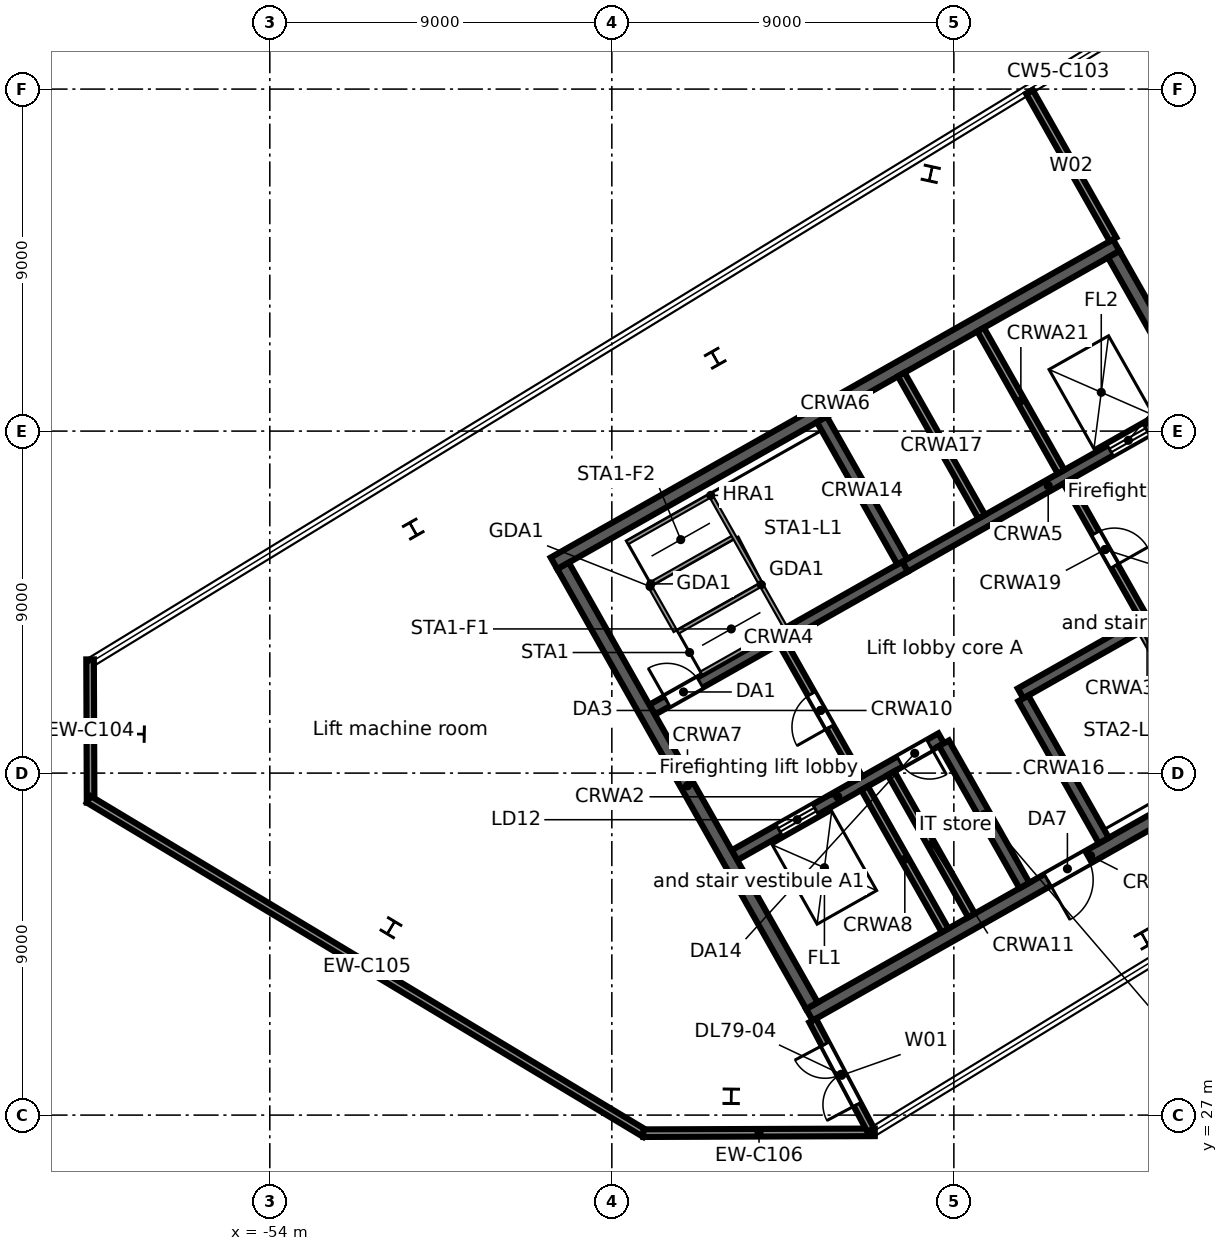
"""IFC4 building model, lengths in metres.
Left out: names, types, materials, properties, quantities, classifications, styles, units other than length and angle.
Written with IfcOpenShell. Run it as: python <this file> out.ifc"""

import sys

from ifc_helpers import new_model, si_unit, direction, frame, frame_2d, origin, origin_2d, place, context, subcontext, project, spatial, rectangle, i_section, extrude, element, fill, save


model = new_model("IFC4")
c1 = context("Model", 3, precision=1e-05, world=origin(), true_north=direction((0.0, 1.0)))
c2 = subcontext(c1, "Body", "Model", "MODEL_VIEW")
j1 = project(units=[si_unit("LENGTHUNIT", "METRE"), si_unit("PLANEANGLEUNIT", "RADIAN")], contexts=[c1])
p1 = place(None, origin())
s1 = spatial("IfcSite", under=j1, at=p1, CompositionType="ELEMENT")
p2 = place(p1, origin())
s2 = spatial("IfcBuilding", under=s1, at=p2, CompositionType="ELEMENT")
p3 = place(p2, frame((0.0, 0.0, 346.9)))
s3 = spatial("IfcBuildingStorey", under=s2, at=p3, CompositionType="ELEMENT", Elevation=346.9)
for number, where, z_axis, x_axis in (
    (1, (-42.28, 46.919, 0.0), (0.0, 0.0, 1.0), (-0.87, -0.492, 0.0)),
    (2, (-50.226, 42.423, 0.0), (0.0, 0.0, 1.0), (-0.87, -0.492, 0.0)),
    (3, (-57.493, 37.027, 0.0), (0.0, 0.0, 1.0), (-0.013, -1.0, 0.0)),
    (4, (-50.812, 31.931, 0.0), (0.0, 0.0, 1.0), (0.857, -0.515, 0.0)),
    (5, (-41.858, 27.495, 0.0), (0.0, 0.0, 1.0), (1.0, -0.013, 0.0)),
    (6, (-30.976, 31.635, 0.0), (0.0, 0.0, 1.0), (0.87, 0.492, 0.0)),
):
    element("IfcColumn", number, at=place(p3, frame(where, z_axis=z_axis, x_axis=x_axis)), inside=s3, PredefinedType="COLUMN", context=c2, shape_type="SweptSolid", body=[
        extrude(i_section(OverallWidth=0.4, OverallDepth=0.4, WebThickness=0.013, FlangeThickness=0.021, FilletRadius=0.022, at=origin_2d()), origin(), (0.0, 0.0, 1.0), 3.6),
    ])
p4 = place(p3, frame((-36.609, 51.77, -0.3), z_axis=(0.0, 0.0, 1.0), x_axis=(-0.97666103348, 0.214786465314, 0.0)))
e7 = element("IfcColumn", 7, at=p4, inside=s3, PredefinedType="COLUMN", context=c2, shape_type="SweptSolid", body=[
    extrude(i_section(OverallWidth=0.4, OverallDepth=0.4, WebThickness=0.013, FlangeThickness=0.021, FilletRadius=0.022, at=origin_2d()), origin(), (0.0, 0.0, 1.0), 3.9),
])
p5 = place(p3, frame((-58.716, 35.224, 0.0), z_axis=(0.0, 0.0, 1.0), x_axis=(-0.003563076631, 0.999993652222, 0.0)))
e8 = element("IfcWall", 8, at=p5, inside=s3, PredefinedType="STANDARD", context=c2, shape_type="SweptSolid", body=[
    extrude(rectangle(XDim=3.769, YDim=0.2, at=frame_2d((1.884, 0.0))), origin(), (0.0, 0.0, 1.0), 3.3),
])
p6 = place(p3, frame((-44.12, 26.51, 0.0), z_axis=(0.0, 0.0, 1.0), x_axis=(-0.85716996621, 0.515033638734, 0.0)))
e9 = element("IfcWall", 9, at=p6, inside=s3, PredefinedType="STANDARD", context=c2, shape_type="SweptSolid", body=[
    extrude(rectangle(XDim=17.084, YDim=0.2, at=frame_2d((8.542, 0.0))), origin(), (0.0, 0.0, 1.0), 3.3),
])
p7 = place(p3, frame((-38.081, 26.546, 0.0), z_axis=(0.0, 0.0, 1.0), x_axis=(-0.999993637837, -0.003567111574, 0.0)))
e10 = element("IfcWall", 10, at=p7, inside=s3, PredefinedType="STANDARD", context=c2, shape_type="SweptSolid", body=[
    extrude(rectangle(XDim=6.091, YDim=0.2, at=frame_2d((3.046, 0.0))), origin(), (0.0, 0.0, 1.0), 3.3),
])
p8 = place(p3, frame((-39.801, 29.64, 0.0), z_axis=(0.0, 0.0, 1.0), x_axis=(0.870359753402, 0.492416388494, 0.0)))
e11 = element("IfcWall", 11, at=p8, inside=s3, PredefinedType="SOLIDWALL", context=c2, shape_type="SweptSolid", body=[
    extrude(rectangle(XDim=17.0, YDim=0.35, at=frame_2d((8.5, 0.0))), origin(), (0.0, 0.0, 1.0), 3.3),
])
p9 = place(p8, frame((7.2, 0.0, 0.0)))
e12 = element("IfcOpeningElement", 12, at=p9, cuts=e11, PredefinedType="OPENING", context=c2, shape_type="SweptSolid", body=[
    extrude(rectangle(XDim=1.2, YDim=2.1, at=frame_2d((0.6, 1.05))), frame((0.0, 0.185, 0.0), z_axis=(0.0, -1.0, 0.0), x_axis=(1.0, 0.0, 0.0)), (0.0, 0.0, 1.0), 0.37),
])
p10 = place(p3, frame((-41.774, 33.838, 0.0), z_axis=(0.0, 0.0, 1.0), x_axis=(0.870355415866, 0.492424055132, 0.0)))
e13 = element("IfcWall", 13, at=p10, inside=s3, PredefinedType="SOLIDWALL", context=c2, shape_type="SweptSolid", body=[
    extrude(rectangle(XDim=6.25, YDim=0.3, at=frame_2d((3.125, 0.0))), origin(), (0.0, 0.0, 1.0), 3.3),
])
p11 = place(p10, frame((1.35, 0.0, 0.0)))
e14 = element("IfcOpeningElement", 14, at=p11, cuts=e13, PredefinedType="OPENING", context=c2, shape_type="SweptSolid", body=[
    extrude(rectangle(XDim=1.1, YDim=2.1, at=frame_2d((0.55, 1.05))), frame((0.0, 0.16, 0.0), z_axis=(0.0, -1.0, 0.0), x_axis=(1.0, 0.0, 0.0)), (0.0, 0.0, 1.0), 0.32),
])
p12 = place(p10, frame((5.0, 0.0, 0.0)))
e15 = element("IfcOpeningElement", 15, at=p12, cuts=e13, PredefinedType="OPENING", context=c2, shape_type="SweptSolid", body=[
    extrude(rectangle(XDim=0.9, YDim=2.1, at=frame_2d((0.45, 1.05))), frame((0.0, 0.16, 0.0), z_axis=(0.0, -1.0, 0.0), x_axis=(1.0, 0.0, 0.0)), (0.0, 0.0, 1.0), 0.32),
])
p13 = place(p3, frame((-34.245, 38.097, 0.0), z_axis=(0.0, 0.0, 1.0), x_axis=(0.870352347706, 0.49242947804, 0.0)))
e16 = element("IfcWall", 16, at=p13, inside=s3, PredefinedType="SOLIDWALL", context=c2, shape_type="SweptSolid", body=[
    extrude(rectangle(XDim=7.65, YDim=0.3, at=frame_2d((3.825, 0.0))), origin(), (0.0, 0.0, 1.0), 3.3),
])
p14 = place(p13, frame((6.2, 0.0, 0.0)))
e17 = element("IfcOpeningElement", 17, at=p14, cuts=e16, PredefinedType="OPENING", context=c2, shape_type="SweptSolid", body=[
    extrude(rectangle(XDim=1.0, YDim=2.1, at=frame_2d((0.5, 1.05))), frame((0.0, 0.16, 0.0), z_axis=(0.0, -1.0, 0.0), x_axis=(1.0, 0.0, 0.0)), (0.0, 0.0, 1.0), 0.32),
])
p15 = place(p3, frame((-43.94, 37.667, 0.0), z_axis=(0.0, 0.0, 1.0), x_axis=(0.870352347706, 0.49242947804, 0.0)))
e18 = element("IfcWall", 18, at=p15, inside=s3, PredefinedType="SOLIDWALL", context=c2, shape_type="SweptSolid", body=[
    extrude(rectangle(XDim=7.65, YDim=0.3, at=frame_2d((3.825, 0.0))), origin(), (0.0, 0.0, 1.0), 3.3),
])
p16 = place(p15, frame((0.45, 0.0, 0.0)))
e19 = element("IfcOpeningElement", 19, at=p16, cuts=e18, PredefinedType="OPENING", context=c2, shape_type="SweptSolid", body=[
    extrude(rectangle(XDim=1.0, YDim=2.1, at=frame_2d((0.5, 1.05))), frame((0.0, 0.16, 0.0), z_axis=(0.0, -1.0, 0.0), x_axis=(1.0, 0.0, 0.0)), (0.0, 0.0, 1.0), 0.32),
])
p17 = place(p3, frame((-37.282, 41.435, 0.0), z_axis=(0.0, 0.0, 1.0), x_axis=(0.870364588774, 0.492407841741, 0.0)))
e20 = element("IfcWall", 20, at=p17, inside=s3, PredefinedType="SOLIDWALL", context=c2, shape_type="SweptSolid", body=[
    extrude(rectangle(XDim=8.65, YDim=0.3, at=frame_2d((4.325, 0.0))), origin(), (0.0, 0.0, 1.0), 3.3),
])
p18 = place(p17, frame((6.2, 0.0, 0.0)))
e21 = element("IfcOpeningElement", 21, at=p18, cuts=e20, PredefinedType="OPENING", context=c2, shape_type="SweptSolid", body=[
    extrude(rectangle(XDim=1.1, YDim=2.1, at=frame_2d((0.55, 1.05))), frame((0.0, 0.16, 0.0), z_axis=(0.0, -1.0, 0.0), x_axis=(1.0, 0.0, 0.0)), (0.0, 0.0, 1.0), 0.32),
])
p19 = place(p3, frame((-46.522, 41.521, 0.0), z_axis=(0.0, 0.0, 1.0), x_axis=(0.870359753402, 0.492416388494, 0.0)))
e22 = element("IfcWall", 22, at=p19, inside=s3, PredefinedType="SOLIDWALL", context=c2, shape_type="SweptSolid", body=[
    extrude(rectangle(XDim=17.0, YDim=0.35, at=frame_2d((8.5, 0.0))), origin(), (0.0, 0.0, 1.0), 3.3),
])
p20 = place(p3, frame((-46.284, 41.454, 0.0), z_axis=(0.0, 0.0, 1.0), x_axis=(0.492429810477, -0.870352159619, 0.0)))
e23 = element("IfcWall", 23, at=p20, inside=s3, PredefinedType="SOLIDWALL", context=c2, shape_type="SweptSolid", body=[
    extrude(rectangle(XDim=13.3, YDim=0.35, at=frame_2d((6.65, 0.0))), origin(), (0.0, 0.0, 1.0), 3.3),
])
p21 = place(p3, frame((-38.349, 35.603, 0.0), z_axis=(0.0, 0.0, 1.0), x_axis=(0.492410799949, -0.870362915164, 0.0)))
e24 = element("IfcWall", 24, at=p21, inside=s3, PredefinedType="SOLIDWALL", context=c2, shape_type="SweptSolid", body=[
    extrude(rectangle(XDim=4.3, YDim=0.2, at=frame_2d((2.15, 0.0))), origin(), (0.0, 0.0, 1.0), 3.3),
])
p22 = place(p3, frame((-40.516, 39.433, 0.0), z_axis=(0.0, 0.0, 1.0), x_axis=(0.492453559952, -0.87033872216, 0.0)))
e25 = element("IfcWall", 25, at=p22, inside=s3, PredefinedType="PARTITIONING", context=c2, shape_type="SweptSolid", body=[
    extrude(rectangle(XDim=4.1, YDim=0.2, at=frame_2d((2.05, 0.0))), origin(), (0.0, 0.0, 1.0), 3.3),
])
p23 = place(p22, frame((1.55, 0.0, 0.0)))
e26 = element("IfcOpeningElement", 26, at=p23, cuts=e25, PredefinedType="OPENING", context=c2, shape_type="SweptSolid", body=[
    extrude(rectangle(XDim=1.0, YDim=2.1, at=frame_2d((0.5, 1.05))), frame((0.0, 0.11, 0.0), z_axis=(0.0, -1.0, 0.0), x_axis=(1.0, 0.0, 0.0)), (0.0, 0.0, 1.0), 0.22),
])
p24 = place(p3, frame((-37.653, 35.997, 0.0), z_axis=(0.0, 0.0, 1.0), x_axis=(0.492435133428, -0.870349147967, 0.0)))
e27 = element("IfcWall", 27, at=p24, inside=s3, PredefinedType="SOLIDWALL", context=c2, shape_type="SweptSolid", body=[
    extrude(rectangle(XDim=4.3, YDim=0.2, at=frame_2d((2.15, 0.0))), origin(), (0.0, 0.0, 1.0), 3.3),
])
p25 = place(p3, frame((-36.26, 36.785, 0.0), z_axis=(0.0, 0.0, 1.0), x_axis=(0.492435133428, -0.870349147967, 0.0)))
e28 = element("IfcWall", 28, at=p25, inside=s3, PredefinedType="SOLIDWALL", context=c2, shape_type="SweptSolid", body=[
    extrude(rectangle(XDim=4.3, YDim=0.3, at=frame_2d((2.15, 0.0))), origin(), (0.0, 0.0, 1.0), 3.3),
])
p26 = place(p3, frame((-39.473, 45.308, 0.0), z_axis=(0.0, 0.0, 1.0), x_axis=(0.492410799949, -0.870362915164, 0.0)))
e29 = element("IfcWall", 29, at=p26, inside=s3, PredefinedType="SOLIDWALL", context=c2, shape_type="SweptSolid", body=[
    extrude(rectangle(XDim=4.3, YDim=0.3, at=frame_2d((2.15, 0.0))), origin(), (0.0, 0.0, 1.0), 3.3),
])
p27 = place(p3, frame((-34.171, 37.967, 0.0), z_axis=(0.0, 0.0, 1.0), x_axis=(0.492435133428, -0.870349147967, 0.0)))
e30 = element("IfcWall", 30, at=p27, inside=s3, PredefinedType="SOLIDWALL", context=c2, shape_type="SweptSolid", body=[
    extrude(rectangle(XDim=4.3, YDim=0.3, at=frame_2d((2.15, 0.0))), origin(), (0.0, 0.0, 1.0), 3.3),
])
p28 = place(p3, frame((-37.385, 46.49, 0.0), z_axis=(0.0, 0.0, 1.0), x_axis=(0.492410799949, -0.870362915164, 0.0)))
e31 = element("IfcWall", 31, at=p28, inside=s3, PredefinedType="SOLIDWALL", context=c2, shape_type="SweptSolid", body=[
    extrude(rectangle(XDim=4.3, YDim=0.2, at=frame_2d((2.15, 0.0))), origin(), (0.0, 0.0, 1.0), 3.3),
])
p29 = place(p3, frame((-33.031, 43.667, 0.0), z_axis=(0.0, 0.0, 1.0), x_axis=(0.492408451753, -0.87036424366, 0.0)))
e32 = element("IfcWall", 32, at=p29, inside=s3, PredefinedType="PARTITIONING", context=c2, shape_type="SweptSolid", body=[
    extrude(rectangle(XDim=4.1, YDim=0.2, at=frame_2d((2.05, 0.0))), origin(), (0.0, 0.0, 1.0), 3.3),
])
p30 = place(p29, frame((1.55, 0.0, 0.0)))
e33 = element("IfcOpeningElement", 33, at=p30, cuts=e32, PredefinedType="OPENING", context=c2, shape_type="SweptSolid", body=[
    extrude(rectangle(XDim=1.0, YDim=2.1, at=frame_2d((0.5, 1.05))), frame((0.0, 0.11, 0.0), z_axis=(0.0, -1.0, 0.0), x_axis=(1.0, 0.0, 0.0)), (0.0, 0.0, 1.0), 0.22),
])
p31 = place(p3, frame((-35.296, 47.671, 0.0), z_axis=(0.0, 0.0, 1.0), x_axis=(0.492435133428, -0.870349147967, 0.0)))
e34 = element("IfcWall", 34, at=p31, inside=s3, PredefinedType="SOLIDWALL", context=c2, shape_type="SweptSolid", body=[
    extrude(rectangle(XDim=4.3, YDim=0.2, at=frame_2d((2.15, 0.0))), origin(), (0.0, 0.0, 1.0), 3.3),
])
p32 = place(p3, frame((-31.792, 49.653, 0.0), z_axis=(0.0, 0.0, 1.0), x_axis=(0.492421943245, -0.870356610712, 0.0)))
e35 = element("IfcWall", 35, at=p32, inside=s3, PredefinedType="SOLIDWALL", context=c2, shape_type="SweptSolid", body=[
    extrude(rectangle(XDim=13.3, YDim=0.35, at=frame_2d((6.65, 0.0))), origin(), (0.0, 0.0, 1.0), 3.3),
])
p33 = place(p3, frame((-39.715, 29.488, 0.0), z_axis=(0.0, 0.0, 1.0), x_axis=(0.467963390189, -0.883747851733, 0.0)))
e36 = element("IfcWall", 36, at=p33, inside=s3, PredefinedType="PARTITIONING", context=c2, shape_type="SweptSolid", body=[
    extrude(rectangle(XDim=3.261, YDim=0.2, at=frame_2d((1.631, 0.0))), origin(), (0.0, 0.0, 1.0), 2.68),
])
p34 = place(p33, frame((0.7, 0.0, 0.0)))
e37 = element("IfcOpeningElement", 37, at=p34, cuts=e36, PredefinedType="OPENING", context=c2, shape_type="SweptSolid", body=[
    extrude(rectangle(XDim=1.8, YDim=2.1, at=frame_2d((0.9, 1.05))), frame((0.0, 0.11, 0.0), z_axis=(0.0, -1.0, 0.0), x_axis=(1.0, 0.0, 0.0)), (0.0, 0.0, 1.0), 0.22),
])
p35 = place(p3, frame((-34.012, 53.93, 0.0), z_axis=(0.0, 0.0, 1.0), x_axis=(0.49265524993, -0.870224571428, 0.0)))
e38 = element("IfcWall", 38, at=p35, inside=s3, PredefinedType="PARTITIONING", context=c2, shape_type="SweptSolid", body=[
    extrude(rectangle(XDim=4.466, YDim=0.2, at=frame_2d((2.233, 0.0))), origin(), (0.0, 0.0, 1.0), 2.68),
])
p36 = place(p18, origin())
e39 = element("IfcDoor", 39, at=p36, inside=s3, OperationType="DOUBLE_DOOR_SLIDING", PredefinedType="DOOR", context=c2, shape_type="SweptSolid", body=[
    extrude(rectangle(XDim=1.1, YDim=2.1, at=frame_2d((0.55, 1.05))), frame((0.0, 0.025, 0.0), z_axis=(0.0, -1.0, 0.0), x_axis=(1.0, 0.0, 0.0)), (0.0, 0.0, 1.0), 0.05),
])
fill(e21, e39)
p37 = place(p11, origin())
e40 = element("IfcDoor", 40, at=p37, inside=s3, OperationType="DOUBLE_DOOR_SLIDING", PredefinedType="DOOR", context=c2, shape_type="SweptSolid", body=[
    extrude(rectangle(XDim=1.1, YDim=2.1, at=frame_2d((0.55, 1.05))), frame((0.0, 0.025, 0.0), z_axis=(0.0, -1.0, 0.0), x_axis=(1.0, 0.0, 0.0)), (0.0, 0.0, 1.0), 0.05),
])
fill(e14, e40)
p38 = place(p16, origin())
e41 = element("IfcDoor", 41, at=p38, inside=s3, OperationType="SINGLE_SWING_LEFT", PredefinedType="DOOR", context=c2, shape_type="SweptSolid", body=[
    extrude(rectangle(XDim=1.0, YDim=2.1, at=frame_2d((0.5, 1.05))), frame((0.0, 0.025, 0.0), z_axis=(0.0, -1.0, 0.0), x_axis=(1.0, 0.0, 0.0)), (0.0, 0.0, 1.0), 0.05),
])
fill(e19, e41)
p39 = place(p23, frame((1.0, 0.0, 0.0), z_axis=(0.0, 0.0, 1.0), x_axis=(-1.0, 0.0, 0.0)))
e42 = element("IfcDoor", 42, at=p39, inside=s3, OperationType="SINGLE_SWING_LEFT", PredefinedType="DOOR", context=c2, shape_type="SweptSolid", body=[
    extrude(rectangle(XDim=1.0, YDim=2.1, at=frame_2d((0.5, 1.05))), frame((0.0, 0.025, 0.0), z_axis=(0.0, -1.0, 0.0), x_axis=(1.0, 0.0, 0.0)), (0.0, 0.0, 1.0), 0.05),
])
fill(e26, e42)
p40 = place(p30, origin())
e43 = element("IfcDoor", 43, at=p40, inside=s3, OperationType="SINGLE_SWING_RIGHT", PredefinedType="DOOR", context=c2, shape_type="SweptSolid", body=[
    extrude(rectangle(XDim=1.0, YDim=2.1, at=frame_2d((0.5, 1.05))), frame((0.0, 0.025, 0.0), z_axis=(0.0, -1.0, 0.0), x_axis=(1.0, 0.0, 0.0)), (0.0, 0.0, 1.0), 0.05),
])
fill(e33, e43)
p41 = place(p9, frame((1.2, 0.0, 0.0), z_axis=(0.0, 0.0, 1.0), x_axis=(-1.0, 0.0, 0.0)))
e44 = element("IfcDoor", 44, at=p41, inside=s3, OperationType="SINGLE_SWING_RIGHT", PredefinedType="DOOR", context=c2, shape_type="SweptSolid", body=[
    extrude(rectangle(XDim=1.2, YDim=2.1, at=frame_2d((0.6, 1.05))), frame((0.0, 0.025, 0.0), z_axis=(0.0, -1.0, 0.0), x_axis=(1.0, 0.0, 0.0)), (0.0, 0.0, 1.0), 0.05),
])
fill(e12, e44)
p42 = place(p12, frame((0.9, 0.0, 0.0), z_axis=(0.0, 0.0, 1.0), x_axis=(-1.0, 0.0, 0.0)))
e45 = element("IfcDoor", 45, at=p42, inside=s3, OperationType="SINGLE_SWING_LEFT", PredefinedType="DOOR", context=c2, shape_type="SweptSolid", body=[
    extrude(rectangle(XDim=0.9, YDim=2.1, at=frame_2d((0.45, 1.05))), frame((0.0, 0.025, 0.0), z_axis=(0.0, -1.0, 0.0), x_axis=(1.0, 0.0, 0.0)), (0.0, 0.0, 1.0), 0.05),
])
fill(e15, e45)
p43 = place(p34, frame((1.8, 0.0, 0.0), z_axis=(0.0, 0.0, 1.0), x_axis=(-1.0, 0.0, 0.0)))
e46 = element("IfcDoor", 46, at=p43, inside=s3, OperationType="DOUBLE_DOOR_SINGLE_SWING", PredefinedType="DOOR", context=c2, shape_type="SweptSolid", body=[
    extrude(rectangle(XDim=1.8, YDim=2.1, at=frame_2d((0.9, 1.05))), frame((0.0, 0.025, 0.0), z_axis=(0.0, -1.0, 0.0), x_axis=(1.0, 0.0, 0.0)), (0.0, 0.0, 1.0), 0.05),
])
fill(e37, e46)
save(model, sys.argv[1])
